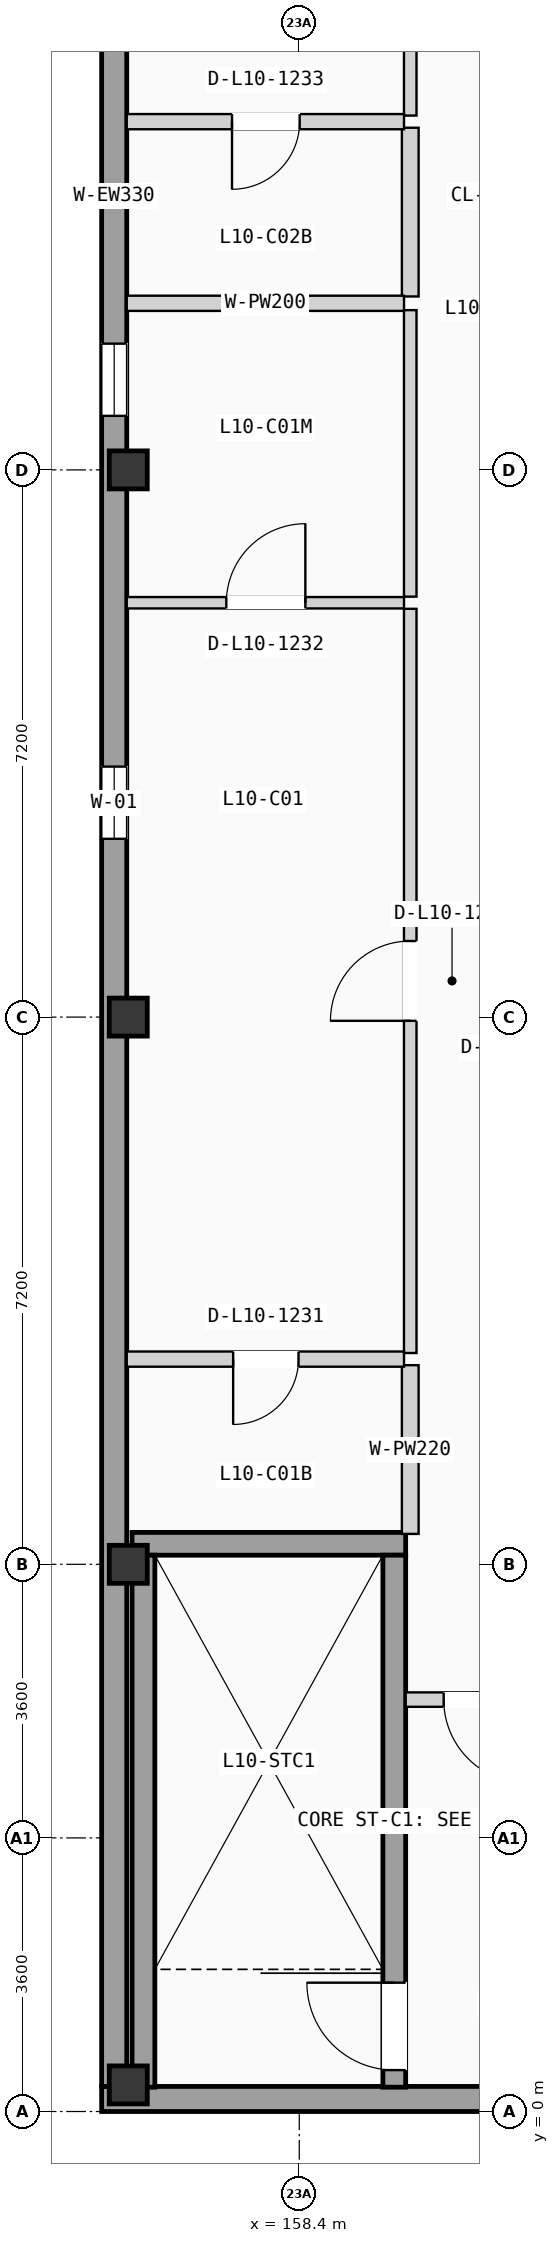
"""IFC4 building model, lengths in metres.
Left out: names, types, materials, properties, quantities, classifications, styles, units other than length and angle.
Written with IfcOpenShell. Run it as: python <this file> out.ifc"""

import sys

from ifc_helpers import new_model, si_unit, direction, frame, frame_2d, origin, origin_2d, place, context, subcontext, project, spatial, rectangle, extrude, element, fill, save


model = new_model("IFC4")
c1 = context("Model", 3, precision=1e-05, world=origin(), true_north=direction((0.0, 1.0)))
c2 = subcontext(c1, "Body", "Model", "MODEL_VIEW")
j1 = project(units=[si_unit("LENGTHUNIT", "METRE"), si_unit("PLANEANGLEUNIT", "RADIAN")], contexts=[c1])
p1 = place(None, origin())
s1 = spatial("IfcSite", under=j1, at=p1, CompositionType="ELEMENT")
p2 = place(p1, origin())
s2 = spatial("IfcBuilding", under=s1, at=p2, CompositionType="ELEMENT")
p3 = place(p2, frame((0.0, 0.0, 34.125)))
s3 = spatial("IfcBuildingStorey", under=s2, at=p3, CompositionType="ELEMENT", Elevation=34.125)
for number, where, z_axis, x_axis in (
    (1, (156.15, 0.35, 0.0), (0.0, 0.0, 1.0), (1.0, 0.0, 0.0)),
    (2, (156.15, 7.2, 0.0), (0.0, 0.0, 1.0), (1.0, 0.0, 0.0)),
    (3, (156.15, 14.4, 0.0), (0.0, 0.0, 1.0), (1.0, 0.0, 0.0)),
    (4, (156.15, 21.6, 0.0), (0.0, 0.0, 1.0), (1.0, 0.0, 0.0)),
):
    element("IfcColumn", number, at=place(p3, frame(where, z_axis=z_axis, x_axis=x_axis)), inside=s3, PredefinedType="COLUMN", context=c2, shape_type="SweptSolid", body=[
        extrude(rectangle(XDim=0.5, YDim=0.5, at=origin_2d()), origin(), (0.0, 0.0, 1.0), 2.85),
    ])
p4 = place(p3, frame((155.8, 0.165, 0.0), z_axis=(0.0, 0.0, 1.0), x_axis=(1.0, 0.0, 0.0)))
e5 = element("IfcWall", 5, at=p4, inside=s3, PredefinedType="SOLIDWALL", context=c2, shape_type="SweptSolid", body=[
    extrude(rectangle(XDim=8.8, YDim=0.33, at=frame_2d((4.4, 0.0))), origin(), (0.0, 0.0, 1.0), 2.55),
])
p5 = place(p3, frame((155.965, 0.33, 0.0), z_axis=(0.0, 0.0, 1.0), x_axis=(0.0, 1.0, 0.0)))
e6 = element("IfcWall", 6, at=p5, inside=s3, PredefinedType="SOLIDWALL", context=c2, shape_type="SweptSolid", body=[
    extrude(rectangle(XDim=49.74, YDim=0.33, at=frame_2d((24.87, 0.0))), origin(), (0.0, 0.0, 1.0), 2.55),
])
p6 = place(p5, frame((16.416, 0.0, 0.85)))
e7 = element("IfcOpeningElement", 7, at=p6, cuts=e6, PredefinedType="OPENING", context=c2, shape_type="SweptSolid", body=[
    extrude(rectangle(XDim=0.95, YDim=1.2, at=frame_2d((0.475, 0.6))), frame((0.0, 0.175, 0.0), z_axis=(0.0, -1.0, 0.0), x_axis=(1.0, 0.0, 0.0)), (0.0, 0.0, 1.0), 0.35),
])
p7 = place(p5, frame((21.981, 0.0, 0.85)))
e8 = element("IfcOpeningElement", 8, at=p7, cuts=e6, PredefinedType="OPENING", context=c2, shape_type="SweptSolid", body=[
    extrude(rectangle(XDim=0.95, YDim=1.2, at=frame_2d((0.475, 0.6))), frame((0.0, 0.175, 0.0), z_axis=(0.0, -1.0, 0.0), x_axis=(1.0, 0.0, 0.0)), (0.0, 0.0, 1.0), 0.35),
])
p8 = place(p5, frame((30.92, 0.0, 0.75)))
e9 = element("IfcOpeningElement", 9, at=p8, cuts=e6, PredefinedType="OPENING", context=c2, shape_type="SweptSolid", body=[
    extrude(rectangle(XDim=2.3, YDim=1.35, at=frame_2d((1.15, 0.675))), frame((0.0, 0.175, 0.0), z_axis=(0.0, -1.0, 0.0), x_axis=(1.0, 0.0, 0.0)), (0.0, 0.0, 1.0), 0.35),
])
p9 = place(p3, frame((156.2, 7.47, 0.0), z_axis=(0.0, 0.0, 1.0), x_axis=(1.0, 0.0, 0.0)))
e10 = element("IfcWall", 10, at=p9, inside=s3, PredefinedType="SHEAR", context=c2, shape_type="SweptSolid", body=[
    extrude(rectangle(XDim=3.6, YDim=0.3, at=frame_2d((1.8, 0.0))), origin(), (0.0, 0.0, 1.0), 2.55),
])
p10 = place(p3, frame((156.35, 0.32, 0.0), z_axis=(0.0, 0.0, 1.0), x_axis=(0.0, 1.0, 0.0)))
e11 = element("IfcWall", 11, at=p10, inside=s3, PredefinedType="SHEAR", context=c2, shape_type="SweptSolid", body=[
    extrude(rectangle(XDim=7.0, YDim=0.3, at=frame_2d((3.5, 0.0))), origin(), (0.0, 0.0, 1.0), 2.55),
])
p11 = place(p3, frame((159.65, 0.32, 0.0), z_axis=(0.0, 0.0, 1.0), x_axis=(0.0, 1.0, 0.0)))
e12 = element("IfcWall", 12, at=p11, inside=s3, PredefinedType="SHEAR", context=c2, shape_type="SweptSolid", body=[
    extrude(rectangle(XDim=7.0, YDim=0.3, at=frame_2d((3.5, 0.0))), origin(), (0.0, 0.0, 1.0), 2.55),
])
p12 = place(p11, frame((0.225, 0.0, 0.0)))
e13 = element("IfcOpeningElement", 13, at=p12, cuts=e12, PredefinedType="OPENING", context=c2, shape_type="SweptSolid", body=[
    extrude(rectangle(XDim=1.15, YDim=2.12, at=frame_2d((0.575, 1.06))), frame((0.0, 0.16, 0.0), z_axis=(0.0, -1.0, 0.0), x_axis=(1.0, 0.0, 0.0)), (0.0, 0.0, 1.0), 0.32),
])
p13 = place(p3, frame((159.8, 5.42, 0.0), z_axis=(0.0, 0.0, 1.0), x_axis=(1.0, 0.0, 0.0)))
e14 = element("IfcWall", 14, at=p13, inside=s3, PredefinedType="PARTITIONING", context=c2, shape_type="SweptSolid", body=[
    extrude(rectangle(XDim=1.95, YDim=0.19, at=frame_2d((0.975, 0.0))), origin(), (0.0, 0.0, 1.0), 2.39),
])
p14 = place(p13, frame((0.5, 0.0, 0.0)))
e15 = element("IfcOpeningElement", 15, at=p14, cuts=e14, PredefinedType="OPENING", context=c2, shape_type="SweptSolid", body=[
    extrude(rectangle(XDim=1.1, YDim=2.12, at=frame_2d((0.55, 1.06))), frame((0.0, 0.105, 0.0), z_axis=(0.0, -1.0, 0.0), x_axis=(1.0, 0.0, 0.0)), (0.0, 0.0, 1.0), 0.21),
])
p15 = place(p3, frame((159.86, 7.6, 0.0), z_axis=(0.0, 0.0, 1.0), x_axis=(0.0, 1.0, 0.0)))
e16 = element("IfcWall", 16, at=p15, inside=s3, PredefinedType="PLUMBINGWALL", context=c2, shape_type="SweptSolid", body=[
    extrude(rectangle(XDim=2.22, YDim=0.22, at=frame_2d((1.11, 0.0))), origin(), (0.0, 0.0, 1.0), 2.39),
])
p16 = place(p3, frame((159.86, 9.98, 0.0), z_axis=(0.0, 0.0, 1.0), x_axis=(0.0, 1.0, 0.0)))
e17 = element("IfcWall", 17, at=p16, inside=s3, PredefinedType="PARTITIONING", context=c2, shape_type="SweptSolid", body=[
    extrude(rectangle(XDim=9.792, YDim=0.165, at=frame_2d((4.896, 0.0))), origin(), (0.0, 0.0, 1.0), 2.39),
])
p17 = place(p16, frame((4.371, 0.0, 0.0)))
e18 = element("IfcOpeningElement", 18, at=p17, cuts=e17, PredefinedType="OPENING", context=c2, shape_type="SweptSolid", body=[
    extrude(rectangle(XDim=1.05, YDim=2.13, at=frame_2d((0.525, 1.065))), frame((0.0, 0.093, 0.0), z_axis=(0.0, -1.0, 0.0), x_axis=(1.0, 0.0, 0.0)), (0.0, 0.0, 1.0), 0.185),
])
p18 = place(p3, frame((159.86, 19.932, 0.0), z_axis=(0.0, 0.0, 1.0), x_axis=(0.0, 1.0, 0.0)))
e19 = element("IfcWall", 19, at=p18, inside=s3, PredefinedType="PARTITIONING", context=c2, shape_type="SweptSolid", body=[
    extrude(rectangle(XDim=3.77, YDim=0.165, at=frame_2d((1.885, 0.0))), origin(), (0.0, 0.0, 1.0), 2.39),
])
p19 = place(p3, frame((159.86, 23.882, 0.0), z_axis=(0.0, 0.0, 1.0), x_axis=(0.0, 1.0, 0.0)))
e20 = element("IfcWall", 20, at=p19, inside=s3, PredefinedType="PLUMBINGWALL", context=c2, shape_type="SweptSolid", body=[
    extrude(rectangle(XDim=2.22, YDim=0.22, at=frame_2d((1.11, 0.0))), origin(), (0.0, 0.0, 1.0), 2.39),
])
p20 = place(p3, frame((159.86, 26.262, 0.0), z_axis=(0.0, 0.0, 1.0), x_axis=(0.0, 1.0, 0.0)))
e21 = element("IfcWall", 21, at=p20, inside=s3, PredefinedType="PARTITIONING", context=c2, shape_type="SweptSolid", body=[
    extrude(rectangle(XDim=12.608, YDim=0.165, at=frame_2d((6.304, 0.0))), origin(), (0.0, 0.0, 1.0), 2.39),
])
p21 = place(p20, frame((5.779, 0.0, 0.0)))
e22 = element("IfcOpeningElement", 22, at=p21, cuts=e21, PredefinedType="OPENING", context=c2, shape_type="SweptSolid", body=[
    extrude(rectangle(XDim=1.05, YDim=2.13, at=frame_2d((0.525, 1.065))), frame((0.0, 0.093, 0.0), z_axis=(0.0, -1.0, 0.0), x_axis=(1.0, 0.0, 0.0)), (0.0, 0.0, 1.0), 0.185),
])
p22 = place(p3, frame((156.13, 9.9, 0.0), z_axis=(0.0, 0.0, 1.0), x_axis=(1.0, 0.0, 0.0)))
e23 = element("IfcWall", 23, at=p22, inside=s3, PredefinedType="PLUMBINGWALL", context=c2, shape_type="SweptSolid", body=[
    extrude(rectangle(XDim=3.648, YDim=0.2, at=frame_2d((1.824, 0.0))), origin(), (0.0, 0.0, 1.0), 2.39),
])
p23 = place(p22, frame((1.4, 0.0, 0.0)))
e24 = element("IfcOpeningElement", 24, at=p23, cuts=e23, PredefinedType="OPENING", context=c2, shape_type="SweptSolid", body=[
    extrude(rectangle(XDim=0.86, YDim=2.0, at=frame_2d((0.43, 1.0))), frame((0.0, 0.11, 0.0), z_axis=(0.0, -1.0, 0.0), x_axis=(1.0, 0.0, 0.0)), (0.0, 0.0, 1.0), 0.22),
])
p24 = place(p3, frame((156.13, 19.852, 0.0), z_axis=(0.0, 0.0, 1.0), x_axis=(1.0, 0.0, 0.0)))
e25 = element("IfcWall", 25, at=p24, inside=s3, PredefinedType="PARTITIONING", context=c2, shape_type="SweptSolid", body=[
    extrude(rectangle(XDim=3.648, YDim=0.15, at=frame_2d((1.824, 0.0))), origin(), (0.0, 0.0, 1.0), 2.39),
])
p25 = place(p24, frame((1.31, 0.0, 0.0)))
e26 = element("IfcOpeningElement", 26, at=p25, cuts=e25, PredefinedType="OPENING", context=c2, shape_type="SweptSolid", body=[
    extrude(rectangle(XDim=1.04, YDim=2.08, at=frame_2d((0.52, 1.04))), frame((0.0, 0.085, 0.0), z_axis=(0.0, -1.0, 0.0), x_axis=(1.0, 0.0, 0.0)), (0.0, 0.0, 1.0), 0.17),
])
p26 = place(p3, frame((156.13, 23.792, 0.0), z_axis=(0.0, 0.0, 1.0), x_axis=(1.0, 0.0, 0.0)))
e27 = element("IfcWall", 27, at=p26, inside=s3, PredefinedType="PLUMBINGWALL", context=c2, shape_type="SweptSolid", body=[
    extrude(rectangle(XDim=3.648, YDim=0.2, at=frame_2d((1.824, 0.0))), origin(), (0.0, 0.0, 1.0), 2.39),
])
p27 = place(p3, frame((156.13, 26.182, 0.0), z_axis=(0.0, 0.0, 1.0), x_axis=(1.0, 0.0, 0.0)))
e28 = element("IfcWall", 28, at=p27, inside=s3, PredefinedType="PLUMBINGWALL", context=c2, shape_type="SweptSolid", body=[
    extrude(rectangle(XDim=3.648, YDim=0.2, at=frame_2d((1.824, 0.0))), origin(), (0.0, 0.0, 1.0), 2.39),
])
p28 = place(p27, frame((1.385, 0.0, 0.0)))
e29 = element("IfcOpeningElement", 29, at=p28, cuts=e28, PredefinedType="OPENING", context=c2, shape_type="SweptSolid", body=[
    extrude(rectangle(XDim=0.89, YDim=2.03, at=frame_2d((0.445, 1.015))), frame((0.0, 0.11, 0.0), z_axis=(0.0, -1.0, 0.0), x_axis=(1.0, 0.0, 0.0)), (0.0, 0.0, 1.0), 0.22),
])
p29 = place(p6, origin())
e30 = element("IfcWindow", 30, at=p29, inside=s3, PartitioningType="SINGLE_PANEL", PredefinedType="WINDOW", context=c2, shape_type="SweptSolid", body=[
    extrude(rectangle(XDim=0.95, YDim=1.2, at=frame_2d((0.475, 0.6))), frame((0.0, 0.03, 0.0), z_axis=(0.0, -1.0, 0.0), x_axis=(1.0, 0.0, 0.0)), (0.0, 0.0, 1.0), 0.06),
])
fill(e7, e30)
p30 = place(p7, origin())
e31 = element("IfcWindow", 31, at=p30, inside=s3, PartitioningType="SINGLE_PANEL", PredefinedType="WINDOW", context=c2, shape_type="SweptSolid", body=[
    extrude(rectangle(XDim=0.95, YDim=1.2, at=frame_2d((0.475, 0.6))), frame((0.0, 0.03, 0.0), z_axis=(0.0, -1.0, 0.0), x_axis=(1.0, 0.0, 0.0)), (0.0, 0.0, 1.0), 0.06),
])
fill(e8, e31)
p31 = place(p12, origin())
e32 = element("IfcDoor", 32, at=p31, inside=s3, OperationType="SINGLE_SWING_RIGHT", PredefinedType="DOOR", context=c2, shape_type="SweptSolid", body=[
    extrude(rectangle(XDim=1.15, YDim=2.12, at=frame_2d((0.575, 1.06))), frame((0.0, 0.025, 0.0), z_axis=(0.0, -1.0, 0.0), x_axis=(1.0, 0.0, 0.0)), (0.0, 0.0, 1.0), 0.05),
])
fill(e13, e32)
p32 = place(p14, frame((1.1, 0.0, 0.0), z_axis=(0.0, 0.0, 1.0), x_axis=(-1.0, 0.0, 0.0)))
e33 = element("IfcDoor", 33, at=p32, inside=s3, OperationType="SINGLE_SWING_RIGHT", PredefinedType="DOOR", context=c2, shape_type="SweptSolid", body=[
    extrude(rectangle(XDim=1.1, YDim=2.12, at=frame_2d((0.55, 1.06))), frame((0.0, 0.025, 0.0), z_axis=(0.0, -1.0, 0.0), x_axis=(1.0, 0.0, 0.0)), (0.0, 0.0, 1.0), 0.05),
])
fill(e15, e33)
p33 = place(p17, origin())
e34 = element("IfcDoor", 34, at=p33, inside=s3, OperationType="SINGLE_SWING_LEFT", PredefinedType="DOOR", context=c2, shape_type="SweptSolid", body=[
    extrude(rectangle(XDim=1.05, YDim=2.13, at=frame_2d((0.525, 1.065))), frame((0.0, 0.025, 0.0), z_axis=(0.0, -1.0, 0.0), x_axis=(1.0, 0.0, 0.0)), (0.0, 0.0, 1.0), 0.05),
])
fill(e18, e34)
p34 = place(p23, frame((0.86, 0.0, 0.0), z_axis=(0.0, 0.0, 1.0), x_axis=(-1.0, 0.0, 0.0)))
e35 = element("IfcDoor", 35, at=p34, inside=s3, OperationType="SINGLE_SWING_LEFT", PredefinedType="DOOR", context=c2, shape_type="SweptSolid", body=[
    extrude(rectangle(XDim=0.86, YDim=2.0, at=frame_2d((0.43, 1.0))), frame((0.0, 0.025, 0.0), z_axis=(0.0, -1.0, 0.0), x_axis=(1.0, 0.0, 0.0)), (0.0, 0.0, 1.0), 0.05),
])
fill(e24, e35)
p35 = place(p25, origin())
e36 = element("IfcDoor", 36, at=p35, inside=s3, OperationType="SINGLE_SWING_RIGHT", PredefinedType="DOOR", context=c2, shape_type="SweptSolid", body=[
    extrude(rectangle(XDim=1.04, YDim=2.08, at=frame_2d((0.52, 1.04))), frame((0.0, 0.025, 0.0), z_axis=(0.0, -1.0, 0.0), x_axis=(1.0, 0.0, 0.0)), (0.0, 0.0, 1.0), 0.05),
])
fill(e26, e36)
p36 = place(p28, frame((0.89, 0.0, 0.0), z_axis=(0.0, 0.0, 1.0), x_axis=(-1.0, 0.0, 0.0)))
e37 = element("IfcDoor", 37, at=p36, inside=s3, OperationType="SINGLE_SWING_LEFT", PredefinedType="DOOR", context=c2, shape_type="SweptSolid", body=[
    extrude(rectangle(XDim=0.89, YDim=2.03, at=frame_2d((0.445, 1.015))), frame((0.0, 0.025, 0.0), z_axis=(0.0, -1.0, 0.0), x_axis=(1.0, 0.0, 0.0)), (0.0, 0.0, 1.0), 0.05),
])
fill(e29, e37)
save(model, sys.argv[1])
